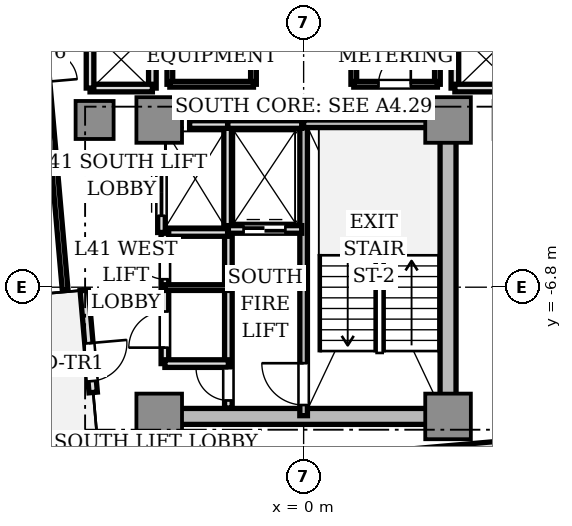
"""IFC4 building model, lengths in metres.
Left out: names, types, materials, properties, quantities, classifications, styles, units other than length and angle.
Written with IfcOpenShell. Run it as: python <this file> out.ifc"""

import sys

from ifc_helpers import new_model, si_unit, direction, frame, frame_2d, origin, origin_2d, place, context, subcontext, project, spatial, rectangle, extrude, source, transform, mapped, element, fill, save


model = new_model("IFC4")
c1 = context("Model", 3, precision=1e-05, world=origin(), true_north=direction((0.0, 1.0)))
c2 = subcontext(c1, "Body", "Model", "MODEL_VIEW")
j1 = project(units=[si_unit("LENGTHUNIT", "METRE"), si_unit("PLANEANGLEUNIT", "RADIAN")], contexts=[c1])
p1 = place(None, origin())
s1 = spatial("IfcSite", under=j1, at=p1, CompositionType="ELEMENT")
p2 = place(p1, origin())
s2 = spatial("IfcBuilding", under=s1, at=p2, CompositionType="ELEMENT")
p3 = place(p2, frame((0.0, 0.0, 150.6)))
s3 = spatial("IfcBuildingStorey", under=s2, at=p3, CompositionType="ELEMENT", Elevation=150.6)
p4 = place(p3, frame((-3.55, -10.2, 0.0), z_axis=(0.0, 0.0, 1.0), x_axis=(1.0, 0.0, 0.0)))
e1 = element("IfcWall", 1, at=p4, inside=s3, PredefinedType="SHEAR", context=c2, shape_type="SweptSolid", body=[
    extrude(rectangle(XDim=7.1, YDim=0.42, at=frame_2d((3.55, 0.0))), origin(), (0.0, 0.0, 1.0), 3.11),
])
p5 = place(p3, frame((3.8, -9.75, 0.0), z_axis=(0.0, 0.0, 1.0), x_axis=(0.0, 1.0, 0.0)))
e2 = element("IfcWall", 2, at=p5, inside=s3, PredefinedType="SHEAR", context=c2, shape_type="SweptSolid", body=[
    extrude(rectangle(XDim=6.9, YDim=0.42, at=frame_2d((3.45, 0.0))), origin(), (0.0, 0.0, 1.0), 3.11),
])
m1 = source(origin(), c2, "Body", "SweptSolid", [
    extrude(rectangle(XDim=1.2, YDim=1.2, at=origin_2d()), origin(), (0.0, 0.0, 1.0), 3.11),
])
for number, where, z_axis, x_axis in (
    (3, (-3.8, -2.4, 0.0), (0.0, 0.0, 1.0), (1.0, 0.0, 0.0)),
    (4, (3.8, -2.4, 0.0), (0.0, 0.0, 1.0), (1.0, 0.0, 0.0)),
    (5, (-3.8, -10.2, 0.0), (0.0, 0.0, 1.0), (1.0, 0.0, 0.0)),
    (6, (3.8, -10.2, 0.0), (0.0, 0.0, 1.0), (1.0, 0.0, 0.0)),
):
    element("IfcColumn", number, at=place(p3, frame(where, z_axis=z_axis, x_axis=x_axis)), inside=s3, PredefinedType="COLUMN", context=c2, shape_type="MappedRepresentation", body=[
        mapped(m1, transform((0.0, 0.0, 0.0), scale=1.0)),
    ])
m2 = source(origin(), c2, "Body", "SweptSolid", [
    extrude(rectangle(XDim=1.0, YDim=1.0, at=origin_2d()), origin(), (0.0, 0.0, 1.0), 3.11),
])
p6 = place(p3, frame((-5.5, -2.4, 0.0), z_axis=(0.0, 0.0, 1.0), x_axis=(1.0, 0.0, 0.0)))
e7 = element("IfcColumn", 7, at=p6, inside=s3, PredefinedType="COLUMN", context=c2, shape_type="MappedRepresentation", body=[
    mapped(m2, transform((0.0, 0.0, 0.0), scale=1.0)),
])
p7 = place(p3, frame((-5.772, -6.879, 0.0), z_axis=(0.0, 0.0, 1.0), x_axis=(0.087168071984, -0.996193619346, 0.0)))
e8 = element("IfcWall", 8, at=p7, inside=s3, PredefinedType="STANDARD", context=c2, shape_type="SweptSolid", body=[
    extrude(rectangle(XDim=2.7, YDim=0.22, at=frame_2d((1.35, 0.0))), origin(), (0.0, 0.0, 1.0), 3.11),
])
p8 = place(p7, frame((1.4, 0.0, 0.0)))
e9 = element("IfcOpeningElement", 9, at=p8, cuts=e8, PredefinedType="OPENING", context=c2, shape_type="SweptSolid", body=[
    extrude(rectangle(XDim=1.0, YDim=2.2, at=frame_2d((0.5, 1.1))), frame((0.0, 0.12, 0.0), z_axis=(0.0, -1.0, 0.0), x_axis=(1.0, 0.0, 0.0)), (0.0, 0.0, 1.0), 0.24),
])
p9 = place(p3, frame((0.0, -10.18, 0.0), z_axis=(0.0, 0.0, 1.0), x_axis=(0.0, 1.0, 0.0)))
e10 = element("IfcWall", 10, at=p9, inside=s3, PredefinedType="SOLIDWALL", context=c2, shape_type="SweptSolid", body=[
    extrude(rectangle(XDim=7.68, YDim=0.2, at=frame_2d((3.84, 0.0))), origin(), (0.0, 0.0, 1.0), 3.11),
])
p10 = place(p9, frame((0.28, 0.0, 0.0)))
e11 = element("IfcOpeningElement", 11, at=p10, cuts=e10, PredefinedType="OPENING", context=c2, shape_type="SweptSolid", body=[
    extrude(rectangle(XDim=1.1, YDim=2.15, at=frame_2d((0.55, 1.075))), frame((0.0, 0.11, 0.0), z_axis=(0.0, -1.0, 0.0), x_axis=(1.0, 0.0, 0.0)), (0.0, 0.0, 1.0), 0.22),
])
p11 = place(p3, frame((0.0, -2.5, 0.0), z_axis=(0.0, 0.0, 1.0), x_axis=(1.0, 0.0, 0.0)))
e12 = element("IfcWall", 12, at=p11, inside=s3, PredefinedType="SOLIDWALL", context=c2, shape_type="SweptSolid", body=[
    extrude(rectangle(XDim=3.72, YDim=0.2, at=frame_2d((1.86, 0.0))), origin(), (0.0, 0.0, 1.0), 3.11),
])
p12 = place(p3, frame((-1.98, -9.98, 0.0), z_axis=(0.0, 0.0, 1.0), x_axis=(0.0, 1.0, 0.0)))
e13 = element("IfcWall", 13, at=p12, inside=s3, PredefinedType="SOLIDWALL", context=c2, shape_type="SweptSolid", body=[
    extrude(rectangle(XDim=4.66, YDim=0.2, at=frame_2d((2.33, 0.0))), origin(), (0.0, 0.0, 1.0), 2.66),
])
p13 = place(p12, frame((0.2, 0.0, 0.0)))
e14 = element("IfcOpeningElement", 14, at=p13, cuts=e13, PredefinedType="OPENING", context=c2, shape_type="SweptSolid", body=[
    extrude(rectangle(XDim=0.85, YDim=2.1, at=frame_2d((0.425, 1.05))), frame((0.0, 0.11, 0.0), z_axis=(0.0, -1.0, 0.0), x_axis=(1.0, 0.0, 0.0)), (0.0, 0.0, 1.0), 0.22),
])
p14 = place(p3, frame((-2.0, -5.28, 0.0), z_axis=(0.0, 0.0, 1.0), x_axis=(0.0, 1.0, 0.0)))
e15 = element("IfcWall", 15, at=p14, inside=s3, PredefinedType="SOLIDWALL", context=c2, shape_type="SweptSolid", body=[
    extrude(rectangle(XDim=2.78, YDim=0.2, at=frame_2d((1.39, 0.0))), origin(), (0.0, 0.0, 1.0), 2.66),
])
p15 = place(p3, frame((-2.0, -2.52, 0.0), z_axis=(0.0, 0.0, 1.0), x_axis=(1.0, 0.0, 0.0)))
e16 = element("IfcWall", 16, at=p15, inside=s3, PredefinedType="SOLIDWALL", context=c2, shape_type="SweptSolid", body=[
    extrude(rectangle(XDim=1.95, YDim=0.2, at=frame_2d((0.975, 0.0))), origin(), (0.0, 0.0, 1.0), 2.66),
])
p16 = place(p3, frame((-1.98, -5.28, 0.0), z_axis=(0.0, 0.0, 1.0), x_axis=(1.0, 0.0, 0.0)))
e17 = element("IfcWall", 17, at=p16, inside=s3, PredefinedType="SOLIDWALL", context=c2, shape_type="SweptSolid", body=[
    extrude(rectangle(XDim=1.93, YDim=0.2, at=frame_2d((0.965, 0.0))), origin(), (0.0, 0.0, 1.0), 2.66),
])
p17 = place(p16, frame((0.4, 0.0, 0.0)))
e18 = element("IfcOpeningElement", 18, at=p17, cuts=e17, PredefinedType="OPENING", context=c2, shape_type="SweptSolid", body=[
    extrude(rectangle(XDim=1.1, YDim=2.2, at=frame_2d((0.55, 1.1))), frame((0.0, 0.11, 0.0), z_axis=(0.0, -1.0, 0.0), x_axis=(1.0, 0.0, 0.0)), (0.0, 0.0, 1.0), 0.22),
])
p18 = place(p3, frame((-3.0, -2.52, 0.0), z_axis=(0.0, 0.0, 1.0), x_axis=(1.0, 0.0, 0.0)))
e19 = element("IfcWall", 19, at=p18, inside=s3, PredefinedType="SOLIDWALL", context=c2, shape_type="SweptSolid", body=[
    extrude(rectangle(XDim=1.0, YDim=0.2, at=frame_2d((0.5, 0.0))), origin(), (0.0, 0.0, 1.0), 2.66),
])
p19 = place(p3, frame((-3.74, -5.36, 0.0), z_axis=(0.0, 0.0, 1.0), x_axis=(1.0, 0.0, 0.0)))
e20 = element("IfcWall", 20, at=p19, inside=s3, PredefinedType="SOLIDWALL", context=c2, shape_type="SweptSolid", body=[
    extrude(rectangle(XDim=1.74, YDim=0.2, at=frame_2d((0.87, 0.0))), origin(), (0.0, 0.0, 1.0), 2.66),
])
p20 = place(p3, frame((-3.74, -5.36, 0.0), z_axis=(0.0, 0.0, 1.0), x_axis=(0.0, 1.0, 0.0)))
e21 = element("IfcWall", 21, at=p20, inside=s3, PredefinedType="SOLIDWALL", context=c2, shape_type="SweptSolid", body=[
    extrude(rectangle(XDim=2.08, YDim=0.2, at=frame_2d((1.04, 0.0))), origin(), (0.0, 0.0, 1.0), 2.66),
])
p21 = place(p20, frame((0.44, 0.0, 0.0)))
e22 = element("IfcOpeningElement", 22, at=p21, cuts=e21, PredefinedType="OPENING", context=c2, shape_type="SweptSolid", body=[
    extrude(rectangle(XDim=1.2, YDim=2.2, at=frame_2d((0.6, 1.1))), frame((0.0, 0.11, 0.0), z_axis=(0.0, -1.0, 0.0), x_axis=(1.0, 0.0, 0.0)), (0.0, 0.0, 1.0), 0.22),
])
p22 = place(p3, frame((3.98, -1.56, 0.0), z_axis=(0.0, 0.0, 1.0), x_axis=(0.0, 1.0, 0.0)))
e23 = element("IfcWall", 23, at=p22, inside=s3, PredefinedType="SOLIDWALL", context=c2, shape_type="SweptSolid", body=[
    extrude(rectangle(XDim=3.12, YDim=0.2, at=frame_2d((1.56, 0.0))), origin(), (0.0, 0.0, 1.0), 2.28),
])
p23 = place(p3, frame((3.98, -1.56, 0.0), z_axis=(0.0, 0.0, 1.0), x_axis=(1.0, 0.0, 0.0)))
e24 = element("IfcWall", 24, at=p23, inside=s3, PredefinedType="SOLIDWALL", context=c2, shape_type="SweptSolid", body=[
    extrude(rectangle(XDim=1.64, YDim=0.2, at=frame_2d((0.82, 0.0))), origin(), (0.0, 0.0, 1.0), 2.66),
])
p24 = place(p3, frame((-3.98, -1.56, 0.0), z_axis=(0.0, 0.0, 1.0), x_axis=(0.0, 1.0, 0.0)))
e25 = element("IfcWall", 25, at=p24, inside=s3, PredefinedType="SOLIDWALL", context=c2, shape_type="SweptSolid", body=[
    extrude(rectangle(XDim=3.12, YDim=0.2, at=frame_2d((1.56, 0.0))), origin(), (0.0, 0.0, 1.0), 2.28),
])
p25 = place(p3, frame((-5.62, -1.56, 0.0), z_axis=(0.0, 0.0, 1.0), x_axis=(1.0, 0.0, 0.0)))
e26 = element("IfcWall", 26, at=p25, inside=s3, PredefinedType="SOLIDWALL", context=c2, shape_type="SweptSolid", body=[
    extrude(rectangle(XDim=1.64, YDim=0.2, at=frame_2d((0.82, 0.0))), origin(), (0.0, 0.0, 1.0), 2.66),
])
p26 = place(p3, frame((-5.62, -1.56, 0.0), z_axis=(0.0, 0.0, 1.0), x_axis=(0.0, 1.0, 0.0)))
e27 = element("IfcWall", 27, at=p26, inside=s3, PredefinedType="SOLIDWALL", context=c2, shape_type="SweptSolid", body=[
    extrude(rectangle(XDim=1.56, YDim=0.2, at=frame_2d((0.78, 0.0))), origin(), (0.0, 0.0, 1.0), 2.66),
])
p27 = place(p3, frame((-3.65, -8.81, 0.0), z_axis=(0.0, 0.0, 1.0), x_axis=(0.0, 1.0, 0.0)))
e28 = element("IfcWall", 28, at=p27, inside=s3, PredefinedType="SOLIDWALL", context=c2, shape_type="SweptSolid", body=[
    extrude(rectangle(XDim=3.43, YDim=0.2, at=frame_2d((1.715, 0.0))), origin(), (0.0, 0.0, 1.0), 2.66),
])
p28 = place(p27, frame((0.42, 0.0, 0.0)))
e29 = element("IfcOpeningElement", 29, at=p28, cuts=e28, PredefinedType="OPENING", context=c2, shape_type="SweptSolid", body=[
    extrude(rectangle(XDim=0.95, YDim=2.15, at=frame_2d((0.475, 1.075))), frame((0.0, 0.11, 0.0), z_axis=(0.0, -1.0, 0.0), x_axis=(1.0, 0.0, 0.0)), (0.0, 0.0, 1.0), 0.22),
])
p29 = place(p27, frame((2.22, 0.0, 0.0)))
e30 = element("IfcOpeningElement", 30, at=p29, cuts=e28, PredefinedType="OPENING", context=c2, shape_type="SweptSolid", body=[
    extrude(rectangle(XDim=0.85, YDim=2.1, at=frame_2d((0.425, 1.05))), frame((0.0, 0.11, 0.0), z_axis=(0.0, -1.0, 0.0), x_axis=(1.0, 0.0, 0.0)), (0.0, 0.0, 1.0), 0.22),
])
p30 = place(p3, frame((-3.65, -8.81, 0.0), z_axis=(0.0, 0.0, 1.0), x_axis=(1.0, 0.0, 0.0)))
e31 = element("IfcWall", 31, at=p30, inside=s3, PredefinedType="SOLIDWALL", context=c2, shape_type="SweptSolid", body=[
    extrude(rectangle(XDim=1.67, YDim=0.2, at=frame_2d((0.835, 0.0))), origin(), (0.0, 0.0, 1.0), 2.66),
])
p31 = place(p3, frame((-3.65, -6.81, 0.0), z_axis=(0.0, 0.0, 1.0), x_axis=(1.0, 0.0, 0.0)))
e32 = element("IfcWall", 32, at=p31, inside=s3, PredefinedType="PARTITIONING", context=c2, shape_type="SweptSolid", body=[
    extrude(rectangle(XDim=1.67, YDim=0.15, at=frame_2d((0.835, 0.0))), origin(), (0.0, 0.0, 1.0), 2.66),
])
p32 = place(p3, frame((-1.32, -1.46, 0.0), z_axis=(0.0, 0.0, 1.0), x_axis=(0.0, 1.0, 0.0)))
e33 = element("IfcWall", 33, at=p32, inside=s3, PredefinedType="PARTITIONING", context=c2, shape_type="SweptSolid", body=[
    extrude(rectangle(XDim=2.92, YDim=0.15, at=frame_2d((1.46, 0.0))), origin(), (0.0, 0.0, 1.0), 2.66),
])
p33 = place(p3, frame((-3.52, -1.46, 0.0), z_axis=(0.0, 0.0, 1.0), x_axis=(0.0, 1.0, 0.0)))
e34 = element("IfcWall", 34, at=p33, inside=s3, PredefinedType="PARTITIONING", context=c2, shape_type="SweptSolid", body=[
    extrude(rectangle(XDim=2.92, YDim=0.15, at=frame_2d((1.46, 0.0))), origin(), (0.0, 0.0, 1.0), 2.28),
])
p34 = place(p3, frame((-3.52, -1.46, 0.0), z_axis=(0.0, 0.0, 1.0), x_axis=(1.0, 0.0, 0.0)))
e35 = element("IfcWall", 35, at=p34, inside=s3, PredefinedType="PARTITIONING", context=c2, shape_type="SweptSolid", body=[
    extrude(rectangle(XDim=2.2, YDim=0.15, at=frame_2d((1.1, 0.0))), origin(), (0.0, 0.0, 1.0), 2.66),
])
p35 = place(p3, frame((1.32, -1.46, 0.0), z_axis=(0.0, 0.0, 1.0), x_axis=(0.0, 1.0, 0.0)))
e36 = element("IfcWall", 36, at=p35, inside=s3, PredefinedType="PARTITIONING", context=c2, shape_type="SweptSolid", body=[
    extrude(rectangle(XDim=2.92, YDim=0.15, at=frame_2d((1.46, 0.0))), origin(), (0.0, 0.0, 1.0), 2.66),
])
p36 = place(p3, frame((3.52, -1.46, 0.0), z_axis=(0.0, 0.0, 1.0), x_axis=(0.0, 1.0, 0.0)))
e37 = element("IfcWall", 37, at=p36, inside=s3, PredefinedType="PARTITIONING", context=c2, shape_type="SweptSolid", body=[
    extrude(rectangle(XDim=2.92, YDim=0.15, at=frame_2d((1.46, 0.0))), origin(), (0.0, 0.0, 1.0), 2.28),
])
p37 = place(p3, frame((1.32, -1.46, 0.0), z_axis=(0.0, 0.0, 1.0), x_axis=(1.0, 0.0, 0.0)))
e38 = element("IfcWall", 38, at=p37, inside=s3, PredefinedType="PARTITIONING", context=c2, shape_type="SweptSolid", body=[
    extrude(rectangle(XDim=2.2, YDim=0.15, at=frame_2d((1.1, 0.0))), origin(), (0.0, 0.0, 1.0), 2.66),
])
p38 = place(p37, frame((0.65, 0.0, 0.0)))
e39 = element("IfcOpeningElement", 39, at=p38, cuts=e38, PredefinedType="OPENING", context=c2, shape_type="SweptSolid", body=[
    extrude(rectangle(XDim=0.85, YDim=2.1, at=frame_2d((0.425, 1.05))), frame((0.0, 0.085, 0.0), z_axis=(0.0, -1.0, 0.0), x_axis=(1.0, 0.0, 0.0)), (0.0, 0.0, 1.0), 0.17),
])
p39 = place(p3, frame((-7.373, 5.679, 0.0), z_axis=(0.0, 0.0, 1.0), x_axis=(0.087154691724, -0.996194790044, 0.0)))
e40 = element("IfcWall", 40, at=p39, inside=s3, PredefinedType="PARTITIONING", context=c2, shape_type="SweptSolid", body=[
    extrude(rectangle(XDim=12.6, YDim=0.15, at=frame_2d((6.3, 0.0))), origin(), (0.0, 0.0, 1.0), 2.66),
])
p40 = place(p39, frame((5.5, 0.0, 0.0)))
e41 = element("IfcOpeningElement", 41, at=p40, cuts=e40, PredefinedType="OPENING", context=c2, shape_type="SweptSolid", body=[
    extrude(rectangle(XDim=1.6, YDim=2.25, at=frame_2d((0.8, 1.125))), frame((0.0, 0.085, 0.0), z_axis=(0.0, -1.0, 0.0), x_axis=(1.0, 0.0, 0.0)), (0.0, 0.0, 1.0), 0.17),
])
p41 = place(p3, frame((1.936, -11.224, 0.0), z_axis=(0.0, 0.0, 1.0), x_axis=(0.996194212812, 0.087161289348, 0.0)))
e42 = element("IfcWall", 42, at=p41, inside=s3, PredefinedType="PARTITIONING", context=c2, shape_type="SweptSolid", body=[
    extrude(rectangle(XDim=5.35, YDim=0.18, at=frame_2d((2.675, 0.0))), origin(), (0.0, 0.0, 1.0), 2.66),
])
m3 = source(origin(), c2, "Body", "SweptSolid", [
    extrude(rectangle(XDim=1.0, YDim=0.05, at=origin_2d()), origin(), (0.0, 0.0, 1.0), 2.2),
])
p42 = place(p8, frame((0.5, 0.0, 0.0)))
e43 = element("IfcDoor", 43, at=p42, inside=s3, OperationType="SINGLE_SWING_LEFT", PredefinedType="DOOR", context=c2, shape_type="MappedRepresentation", body=[
    mapped(m3, transform((0.0, 0.0, 0.0), scale=1.0)),
])
fill(e9, e43)
m4 = source(origin(), c2, "Body", "SweptSolid", [
    extrude(rectangle(XDim=1.1, YDim=0.05, at=origin_2d()), origin(), (0.0, 0.0, 1.0), 2.15),
])
p43 = place(p10, frame((0.55, 0.0, 0.0)))
e44 = element("IfcDoor", 44, at=p43, inside=s3, OperationType="SINGLE_SWING_RIGHT", PredefinedType="DOOR", context=c2, shape_type="MappedRepresentation", body=[
    mapped(m4, transform((0.0, 0.0, 0.0), scale=1.0)),
])
fill(e11, e44)
m5 = source(origin(), c2, "Body", "SweptSolid", [
    extrude(rectangle(XDim=0.85, YDim=0.05, at=origin_2d()), origin(), (0.0, 0.0, 1.0), 2.1),
])
p44 = place(p13, frame((0.425, 0.0, 0.0)))
e45 = element("IfcDoor", 45, at=p44, inside=s3, OperationType="SINGLE_SWING_RIGHT", PredefinedType="DOOR", context=c2, shape_type="MappedRepresentation", body=[
    mapped(m5, transform((0.0, 0.0, 0.0), scale=1.0)),
])
fill(e14, e45)
m6 = source(origin(), c2, "Body", "SweptSolid", [
    extrude(rectangle(XDim=1.1, YDim=0.05, at=origin_2d()), origin(), (0.0, 0.0, 1.0), 2.2),
])
p45 = place(p17, frame((0.55, 0.0, 0.0)))
e46 = element("IfcDoor", 46, at=p45, inside=s3, OperationType="DOUBLE_DOOR_SLIDING", PredefinedType="DOOR", context=c2, shape_type="MappedRepresentation", body=[
    mapped(m6, transform((0.0, 0.0, 0.0), scale=1.0)),
])
fill(e18, e46)
m7 = source(origin(), c2, "Body", "SweptSolid", [
    extrude(rectangle(XDim=1.2, YDim=0.05, at=origin_2d()), origin(), (0.0, 0.0, 1.0), 2.2),
])
p46 = place(p21, frame((0.6, 0.0, 0.0)))
e47 = element("IfcDoor", 47, at=p46, inside=s3, OperationType="DOUBLE_DOOR_SLIDING", PredefinedType="DOOR", context=c2, shape_type="MappedRepresentation", body=[
    mapped(m7, transform((0.0, 0.0, 0.0), scale=1.0)),
])
fill(e22, e47)
m8 = source(origin(), c2, "Body", "SweptSolid", [
    extrude(rectangle(XDim=0.95, YDim=0.05, at=origin_2d()), origin(), (0.0, 0.0, 1.0), 2.15),
])
p47 = place(p28, frame((0.475, 0.0, 0.0)))
e48 = element("IfcDoor", 48, at=p47, inside=s3, OperationType="SINGLE_SWING_LEFT", PredefinedType="DOOR", context=c2, shape_type="MappedRepresentation", body=[
    mapped(m8, transform((0.0, 0.0, 0.0), scale=1.0)),
])
fill(e29, e48)
p48 = place(p29, frame((0.425, 0.0, 0.0)))
e49 = element("IfcDoor", 49, at=p48, inside=s3, OperationType="SINGLE_SWING_RIGHT", PredefinedType="DOOR", context=c2, shape_type="MappedRepresentation", body=[
    mapped(m5, transform((0.0, 0.0, 0.0), scale=1.0)),
])
fill(e30, e49)
p49 = place(p38, frame((0.425, 0.0, 0.0)))
e50 = element("IfcDoor", 50, at=p49, inside=s3, OperationType="SINGLE_SWING_RIGHT", PredefinedType="DOOR", context=c2, shape_type="MappedRepresentation", body=[
    mapped(m5, transform((0.0, 0.0, 0.0), scale=1.0)),
])
fill(e39, e50)
save(model, sys.argv[1])
